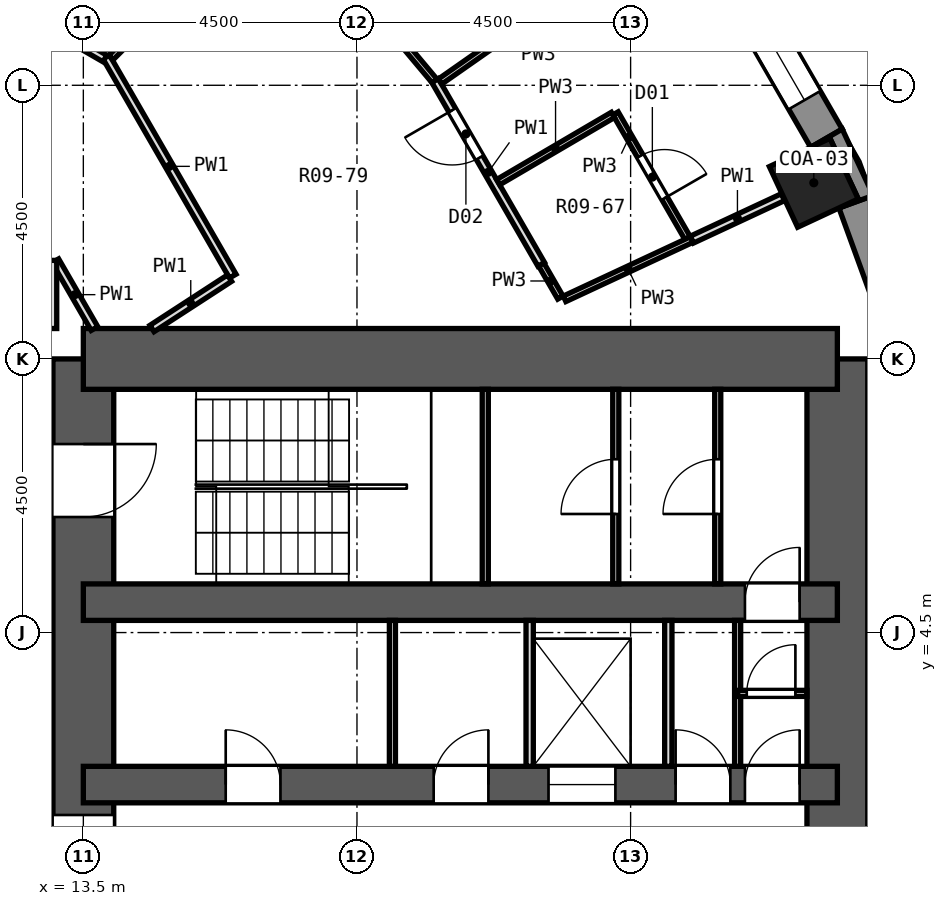
"""IFC4 building model, lengths in metres.
Left out: names, types, materials, properties, quantities, classifications, styles, units other than length and angle.
Written with IfcOpenShell. Run it as: python <this file> out.ifc"""

import sys

from ifc_helpers import new_model, si_unit, direction, frame, frame_2d, origin, origin_2d, place, context, subcontext, project, spatial, polyline, rectangle, outline, extrude, element, fill, save


model = new_model("IFC4")
c1 = context("Model", 3, precision=1e-05, world=origin(), true_north=direction((0.0, 1.0)))
c2 = subcontext(c1, "Body", "Model", "MODEL_VIEW")
j1 = project(units=[si_unit("LENGTHUNIT", "METRE"), si_unit("PLANEANGLEUNIT", "RADIAN")], contexts=[c1])
p1 = place(None, origin())
s1 = spatial("IfcSite", under=j1, at=p1, CompositionType="ELEMENT")
p2 = place(p1, origin())
s2 = spatial("IfcBuilding", under=s1, at=p2, CompositionType="ELEMENT")
p3 = place(p2, frame((0.0, 0.0, 26.3)))
s3 = spatial("IfcBuildingStorey", under=s2, at=p3, CompositionType="ELEMENT", Elevation=26.3)
p4 = place(p3, frame((25.512, 11.897, 0.0), z_axis=(0.0, 0.0, 1.0), x_axis=(0.906307787037, 0.422618261741, 0.0)))
e1 = element("IfcColumn", 1, at=p4, inside=s3, PredefinedType="COLUMN", context=c2, shape_type="SweptSolid", body=[
    extrude(rectangle(XDim=1.1, YDim=1.1, at=origin_2d()), origin(), (0.0, 0.0, 1.0), 3.3),
])
p5 = place(p3, frame((13.5, -9.0, 0.0), z_axis=(0.0, 0.0, 1.0), x_axis=(0.0, 1.0, 0.0)))
e2 = element("IfcWall", 2, at=p5, inside=s3, PredefinedType="SHEAR", context=c2, shape_type="SweptSolid", body=[
    extrude(rectangle(XDim=18.0, YDim=1.0, at=frame_2d((9.0, 0.0))), origin(), (0.0, 0.0, 1.0), 3.3),
])
p6 = place(p5, frame((15.4, 0.0, 0.0)))
e3 = element("IfcOpeningElement", 3, at=p6, cuts=e2, PredefinedType="OPENING", context=c2, shape_type="SweptSolid", body=[
    extrude(rectangle(XDim=1.2, YDim=2.1, at=frame_2d((0.6, 1.05))), frame((0.0, 0.512, 0.0), z_axis=(0.0, -1.0, 0.0), x_axis=(1.0, 0.0, 0.0)), (0.0, 0.0, 1.0), 1.024),
])
p7 = place(p5, frame((1.4, 0.0, 0.0)))
e4 = element("IfcOpeningElement", 4, at=p7, cuts=e2, PredefinedType="OPENING", context=c2, shape_type="SweptSolid", body=[
    extrude(rectangle(XDim=1.2, YDim=2.1, at=frame_2d((0.6, 1.05))), frame((0.0, 0.512, 0.0), z_axis=(0.0, -1.0, 0.0), x_axis=(1.0, 0.0, 0.0)), (0.0, 0.0, 1.0), 1.024),
])
p8 = place(p5, frame((7.5, 0.0, 0.0)))
e5 = element("IfcOpeningElement", 5, at=p8, cuts=e2, PredefinedType="OPENING", context=c2, shape_type="SweptSolid", body=[
    extrude(rectangle(XDim=3.0, YDim=2.4, at=frame_2d((1.5, 1.2))), frame((0.0, 0.512, 0.0), z_axis=(0.0, -1.0, 0.0), x_axis=(1.0, 0.0, 0.0)), (0.0, 0.0, 1.0), 1.024),
])
p9 = place(p3, frame((25.9, -9.0, 0.0), z_axis=(0.0, 0.0, 1.0), x_axis=(0.0, 1.0, 0.0)))
e6 = element("IfcWall", 6, at=p9, inside=s3, PredefinedType="SHEAR", context=c2, shape_type="SweptSolid", body=[
    extrude(rectangle(XDim=18.0, YDim=1.0, at=frame_2d((9.0, 0.0))), origin(), (0.0, 0.0, 1.0), 3.3),
])
p10 = place(p3, frame((13.5, 9.0, 0.0), z_axis=(0.0, 0.0, 1.0), x_axis=(1.0, 0.0, 0.0)))
e7 = element("IfcWall", 7, at=p10, inside=s3, PredefinedType="SHEAR", context=c2, shape_type="SweptSolid", body=[
    extrude(rectangle(XDim=12.4, YDim=1.0, at=frame_2d((6.2, 0.0))), origin(), (0.0, 0.0, 1.0), 3.3),
])
p11 = place(p3, frame((13.5, 5.0, 0.0), z_axis=(0.0, 0.0, 1.0), x_axis=(1.0, 0.0, 0.0)))
e8 = element("IfcWall", 8, at=p11, inside=s3, PredefinedType="SHEAR", context=c2, shape_type="SweptSolid", body=[
    extrude(rectangle(XDim=12.4, YDim=0.6, at=frame_2d((6.2, 0.0))), origin(), (0.0, 0.0, 1.0), 3.3),
])
p12 = place(p11, frame((10.88, 0.0, 0.0)))
e9 = element("IfcOpeningElement", 9, at=p12, cuts=e8, PredefinedType="OPENING", context=c2, shape_type="SweptSolid", body=[
    extrude(rectangle(XDim=0.9, YDim=2.1, at=frame_2d((0.45, 1.05))), frame((0.0, 0.312, 0.0), z_axis=(0.0, -1.0, 0.0), x_axis=(1.0, 0.0, 0.0)), (0.0, 0.0, 1.0), 0.624),
])
p13 = place(p3, frame((13.5, 2.0, 0.0), z_axis=(0.0, 0.0, 1.0), x_axis=(1.0, 0.0, 0.0)))
e10 = element("IfcWall", 10, at=p13, inside=s3, PredefinedType="SHEAR", context=c2, shape_type="SweptSolid", body=[
    extrude(rectangle(XDim=12.4, YDim=0.6, at=frame_2d((6.2, 0.0))), origin(), (0.0, 0.0, 1.0), 3.3),
])
p14 = place(p13, frame((7.65, 0.0, 0.0)))
e11 = element("IfcOpeningElement", 11, at=p14, cuts=e10, PredefinedType="OPENING", context=c2, shape_type="SweptSolid", body=[
    extrude(rectangle(XDim=1.1, YDim=2.1, at=frame_2d((0.55, 1.05))), frame((0.0, 0.312, 0.0), z_axis=(0.0, -1.0, 0.0), x_axis=(1.0, 0.0, 0.0)), (0.0, 0.0, 1.0), 0.624),
])
p15 = place(p13, frame((2.341, 0.0, 0.0)))
e12 = element("IfcOpeningElement", 12, at=p15, cuts=e10, PredefinedType="OPENING", context=c2, shape_type="SweptSolid", body=[
    extrude(rectangle(XDim=0.9, YDim=2.1, at=frame_2d((0.45, 1.05))), frame((0.0, 0.312, 0.0), z_axis=(0.0, -1.0, 0.0), x_axis=(1.0, 0.0, 0.0)), (0.0, 0.0, 1.0), 0.624),
])
p16 = place(p13, frame((5.761, 0.0, 0.0)))
e13 = element("IfcOpeningElement", 13, at=p16, cuts=e10, PredefinedType="OPENING", context=c2, shape_type="SweptSolid", body=[
    extrude(rectangle(XDim=0.9, YDim=2.1, at=frame_2d((0.45, 1.05))), frame((0.0, 0.312, 0.0), z_axis=(0.0, -1.0, 0.0), x_axis=(1.0, 0.0, 0.0)), (0.0, 0.0, 1.0), 0.624),
])
p17 = place(p13, frame((9.74, 0.0, 0.0)))
e14 = element("IfcOpeningElement", 14, at=p17, cuts=e10, PredefinedType="OPENING", context=c2, shape_type="SweptSolid", body=[
    extrude(rectangle(XDim=0.9, YDim=2.1, at=frame_2d((0.45, 1.05))), frame((0.0, 0.312, 0.0), z_axis=(0.0, -1.0, 0.0), x_axis=(1.0, 0.0, 0.0)), (0.0, 0.0, 1.0), 0.624),
])
p18 = place(p13, frame((10.88, 0.0, 0.0)))
e15 = element("IfcOpeningElement", 15, at=p18, cuts=e10, PredefinedType="OPENING", context=c2, shape_type="SweptSolid", body=[
    extrude(rectangle(XDim=0.9, YDim=2.1, at=frame_2d((0.45, 1.05))), frame((0.0, 0.312, 0.0), z_axis=(0.0, -1.0, 0.0), x_axis=(1.0, 0.0, 0.0)), (0.0, 0.0, 1.0), 0.624),
])
p19 = place(p3, frame((27.523, 7.971, 0.0), z_axis=(0.0, 0.0, 1.0), x_axis=(-0.342028474173, 0.939689588564, 0.0)))
e16 = element("IfcWall", 16, at=p19, inside=s3, PredefinedType="SOLIDWALL", context=c2, shape_type="SweptSolid", body=[
    extrude(rectangle(XDim=3.846, YDim=0.6, at=frame_2d((1.923, 0.0))), origin(), (0.0, 0.0, 1.0), 2.75),
])
p20 = place(p3, frame((25.721, 12.63, 0.0), z_axis=(0.0, 0.0, 1.0), x_axis=(-0.499989888488, 0.86603124159, 0.0)))
e17 = element("IfcWall", 17, at=p20, inside=s3, PredefinedType="SOLIDWALL", context=c2, shape_type="SweptSolid", body=[
    extrude(rectangle(XDim=3.846, YDim=0.6, at=frame_2d((1.923, 0.0))), origin(), (0.0, 0.0, 1.0), 2.75),
])
p21 = place(p20, frame((0.723, 0.0, 0.9)))
e18 = element("IfcOpeningElement", 18, at=p21, cuts=e17, PredefinedType="OPENING", context=c2, shape_type="SweptSolid", body=[
    extrude(rectangle(XDim=2.4, YDim=1.8, at=frame_2d((1.2, 0.9))), frame((0.0, 0.312, 0.0), z_axis=(0.0, -1.0, 0.0), x_axis=(1.0, 0.0, 0.0)), (0.0, 0.0, 1.0), 0.624),
])
p22 = place(p3, origin())
e19 = element("IfcWall", 19, at=p22, inside=s3, PredefinedType="SOLIDWALL", context=c2, shape_type="SweptSolid", body=[
    extrude(outline(polyline([(25.981, 12.78), (25.461, 12.479), (25.779, 12.628), (26.243, 11.631), (25.926, 11.483), (26.49, 11.688), (25.981, 12.78)])), origin(), (0.0, 0.0, 1.0), 2.75),
])
p23 = place(p3, frame((13.04, 10.614, 0.0), z_axis=(0.0, 0.0, 1.0), x_axis=(0.500018234033, -0.866014876105, 0.0)))
e20 = element("IfcWall", 20, at=p23, inside=s3, PredefinedType="PARTITIONING", context=c2, shape_type="SweptSolid", body=[
    extrude(rectangle(XDim=1.286, YDim=0.125, at=frame_2d((0.643, 0.0))), origin(), (0.0, 0.0, 1.0), 2.75),
])
p24 = place(p3, frame((13.873, 13.971, 0.0), z_axis=(0.0, 0.0, 1.0), x_axis=(0.500063859158, -0.865988531543, 0.0)))
e21 = element("IfcWall", 21, at=p24, inside=s3, PredefinedType="PARTITIONING", context=c2, shape_type="SweptSolid", body=[
    extrude(rectangle(XDim=4.168, YDim=0.125, at=frame_2d((2.084, 0.0))), origin(), (0.0, 0.0, 1.0), 2.75),
])
p25 = place(p3, frame((21.029, 10.555, 0.0), z_axis=(0.0, 0.0, 1.0), x_axis=(0.49975591337, -0.86616628141, 0.0)))
e22 = element("IfcWall", 22, at=p25, inside=s3, PredefinedType="PARTITIONING", context=c2, shape_type="SweptSolid", body=[
    extrude(rectangle(XDim=0.632, YDim=0.1, at=frame_2d((0.316, 0.0))), origin(), (0.0, 0.0, 1.0), 2.75),
])
p26 = place(p3, frame((19.283, 13.58, 0.0), z_axis=(0.0, 0.0, 1.0), x_axis=(0.500206547268, -0.865906120818, 0.0)))
e23 = element("IfcWall", 23, at=p26, inside=s3, PredefinedType="PARTITIONING", context=c2, shape_type="SweptSolid", body=[
    extrude(rectangle(XDim=3.492, YDim=0.125, at=frame_2d((1.746, 0.0))), origin(), (0.0, 0.0, 1.0), 2.75),
])
p27 = place(p26, frame((0.566, 0.0, 0.0)))
e24 = element("IfcOpeningElement", 24, at=p27, cuts=e23, PredefinedType="OPENING", context=c2, shape_type="SweptSolid", body=[
    extrude(rectangle(XDim=0.9, YDim=2.1, at=frame_2d((0.45, 1.05))), frame((0.0, 0.074, 0.0), z_axis=(0.0, -1.0, 0.0), x_axis=(1.0, 0.0, 0.0)), (0.0, 0.0, 1.0), 0.149),
])
p28 = place(p3, frame((22.252, 13.038, 0.0), z_axis=(0.0, 0.0, 1.0), x_axis=(0.500073288705, -0.865983086396, 0.0)))
e25 = element("IfcWall", 25, at=p28, inside=s3, PredefinedType="PARTITIONING", context=c2, shape_type="SweptSolid", body=[
    extrude(rectangle(XDim=2.369, YDim=0.1, at=frame_2d((1.185, 0.0))), origin(), (0.0, 0.0, 1.0), 2.75),
])
p29 = place(p28, frame((0.811, 0.0, 0.0)))
e26 = element("IfcOpeningElement", 26, at=p29, cuts=e25, PredefinedType="OPENING", context=c2, shape_type="SweptSolid", body=[
    extrude(rectangle(XDim=0.8, YDim=2.1, at=frame_2d((0.4, 1.05))), frame((0.0, 0.062, 0.0), z_axis=(0.0, -1.0, 0.0), x_axis=(1.0, 0.0, 0.0)), (0.0, 0.0, 1.0), 0.124),
])
p30 = place(p3, frame((17.865, 15.252, 0.0), z_axis=(0.0, 0.0, 1.0), x_axis=(0.642711379907, -0.766108401036, 0.0)))
e27 = element("IfcWall", 27, at=p30, inside=s3, PredefinedType="PARTITIONING", context=c2, shape_type="SweptSolid", body=[
    extrude(rectangle(XDim=2.192, YDim=0.1, at=frame_2d((1.096, 0.0))), origin(), (0.0, 0.0, 1.0), 2.75),
])
p31 = place(p3, frame((5.029, 19.036, 0.0), z_axis=(0.0, 0.0, 1.0), x_axis=(0.866024825845, -0.50000100102, 0.0)))
e28 = element("IfcWall", 28, at=p31, inside=s3, PredefinedType="PARTITIONING", context=c2, shape_type="SweptSolid", body=[
    extrude(rectangle(XDim=10.192, YDim=0.125, at=frame_2d((5.096, 0.0))), origin(), (0.0, 0.0, 1.0), 2.75),
])
p32 = place(p31, frame((3.116, 0.0, 0.0)))
e29 = element("IfcOpeningElement", 29, at=p32, cuts=e28, PredefinedType="OPENING", context=c2, shape_type="SweptSolid", body=[
    extrude(rectangle(XDim=1.0, YDim=2.1, at=frame_2d((0.5, 1.05))), frame((0.0, 0.074, 0.0), z_axis=(0.0, -1.0, 0.0), x_axis=(1.0, 0.0, 0.0)), (0.0, 0.0, 1.0), 0.149),
])
p33 = place(p3, frame((21.414, 9.988, 0.0), z_axis=(0.0, 0.0, 1.0), x_axis=(0.906293839501, 0.42264817104, 0.0)))
e30 = element("IfcWall", 30, at=p33, inside=s3, PredefinedType="PARTITIONING", context=c2, shape_type="SweptSolid", body=[
    extrude(rectangle(XDim=2.309, YDim=0.1, at=frame_2d((1.155, 0.0))), origin(), (0.0, 0.0, 1.0), 2.75),
])
p34 = place(p3, frame((23.508, 10.962, 0.0), z_axis=(0.0, 0.0, 1.0), x_axis=(0.906360566975, 0.422505056339, 0.0)))
e31 = element("IfcWall", 31, at=p34, inside=s3, PredefinedType="PARTITIONING", context=c2, shape_type="SweptSolid", body=[
    extrude(rectangle(XDim=1.651, YDim=0.125, at=frame_2d((0.826, 0.0))), origin(), (0.0, 0.0, 1.0), 2.75),
])
p35 = place(p3, frame((20.322, 11.906, 0.0), z_axis=(0.0, 0.0, 1.0), x_axis=(0.862687894762, 0.505736686657, 0.0)))
e32 = element("IfcWall", 32, at=p35, inside=s3, PredefinedType="PARTITIONING", context=c2, shape_type="SweptSolid", body=[
    extrude(rectangle(XDim=2.187, YDim=0.1, at=frame_2d((1.094, 0.0))), origin(), (0.0, 0.0, 1.0), 2.75),
])
p36 = place(p3, frame((14.629, 9.5, 0.0), z_axis=(0.0, 0.0, 1.0), x_axis=(0.83882853689, 0.544395706908, 0.0)))
e33 = element("IfcWall", 33, at=p36, inside=s3, PredefinedType="PARTITIONING", context=c2, shape_type="SweptSolid", body=[
    extrude(rectangle(XDim=1.521, YDim=0.125, at=frame_2d((0.76, 0.0))), origin(), (0.0, 0.0, 1.0), 2.75),
])
p37 = place(p3, frame((19.366, 13.561, 0.0), z_axis=(0.0, 0.0, 1.0), x_axis=(0.819199961449, 0.57350799747, 0.0)))
e34 = element("IfcWall", 34, at=p37, inside=s3, PredefinedType="PARTITIONING", context=c2, shape_type="SweptSolid", body=[
    extrude(rectangle(XDim=3.948, YDim=0.1, at=frame_2d((1.974, 0.0))), origin(), (0.0, 0.0, 1.0), 2.75),
])
p38 = place(p3, frame((13.953, 13.953, 0.0), z_axis=(0.0, 0.0, 1.0), x_axis=(0.707106781187, 0.707106781187, 0.0)))
e35 = element("IfcWall", 35, at=p38, inside=s3, PredefinedType="PARTITIONING", context=c2, shape_type="SweptSolid", body=[
    extrude(rectangle(XDim=2.061, YDim=0.1, at=frame_2d((1.031, 0.0))), origin(), (0.0, 0.0, 1.0), 2.75),
])
p39 = place(p3, frame((13.0, 9.5, 0.0), z_axis=(0.0, 0.0, 1.0), x_axis=(0.0, 1.0, 0.0)))
e36 = element("IfcWall", 36, at=p39, inside=s3, PredefinedType="PARTITIONING", context=c2, shape_type="SweptSolid", body=[
    extrude(rectangle(XDim=1.121, YDim=0.125, at=frame_2d((0.56, 0.0))), origin(), (0.0, 0.0, 1.0), 2.75),
])
p40 = place(p3, frame((18.583, 2.3, 0.0), z_axis=(0.0, 0.0, 1.0), x_axis=(0.0, 1.0, 0.0)))
e37 = element("IfcWall", 37, at=p40, inside=s3, PredefinedType="PARTITIONING", context=c2, shape_type="SweptSolid", body=[
    extrude(rectangle(XDim=2.4, YDim=0.1, at=frame_2d((1.2, 0.0))), origin(), (0.0, 0.0, 1.0), 2.75),
])
for number, where, z_axis, x_axis in (
    (38, (20.84, 2.3, 0.0), (0.0, 0.0, 1.0), (0.0, 1.0, 0.0)),
    (39, (23.12, 2.3, 0.0), (0.0, 0.0, 1.0), (0.0, 1.0, 0.0)),
):
    element("IfcWall", number, at=place(p3, frame(where, z_axis=z_axis, x_axis=x_axis)), inside=s3, PredefinedType="PARTITIONING", context=c2, shape_type="SweptSolid", body=[
        extrude(rectangle(XDim=2.4, YDim=0.12, at=frame_2d((1.2, 0.0))), origin(), (0.0, 0.0, 1.0), 2.75),
    ])
p41 = place(p3, frame((24.26, 2.3, 0.0), z_axis=(0.0, 0.0, 1.0), x_axis=(0.0, 1.0, 0.0)))
e40 = element("IfcWall", 40, at=p41, inside=s3, PredefinedType="PARTITIONING", context=c2, shape_type="SweptSolid", body=[
    extrude(rectangle(XDim=2.4, YDim=0.1, at=frame_2d((1.2, 0.0))), origin(), (0.0, 0.0, 1.0), 2.75),
])
p42 = place(p3, frame((24.26, 3.5, 0.0), z_axis=(0.0, 0.0, 1.0), x_axis=(1.0, 0.0, 0.0)))
e41 = element("IfcWall", 41, at=p42, inside=s3, PredefinedType="PARTITIONING", context=c2, shape_type="SweptSolid", body=[
    extrude(rectangle(XDim=1.14, YDim=0.1, at=frame_2d((0.57, 0.0))), origin(), (0.0, 0.0, 1.0), 2.75),
])
p43 = place(p42, frame((0.15, 0.0, 0.0)))
e42 = element("IfcOpeningElement", 42, at=p43, cuts=e41, PredefinedType="OPENING", context=c2, shape_type="SweptSolid", body=[
    extrude(rectangle(XDim=0.8, YDim=2.1, at=frame_2d((0.4, 1.05))), frame((0.0, 0.062, 0.0), z_axis=(0.0, -1.0, 0.0), x_axis=(1.0, 0.0, 0.0)), (0.0, 0.0, 1.0), 0.124),
])
p44 = place(p3, frame((20.11, 5.3, 0.0), z_axis=(0.0, 0.0, 1.0), x_axis=(0.0, 1.0, 0.0)))
e43 = element("IfcWall", 43, at=p44, inside=s3, PredefinedType="PARTITIONING", context=c2, shape_type="SweptSolid", body=[
    extrude(rectangle(XDim=3.2, YDim=0.1, at=frame_2d((1.6, 0.0))), origin(), (0.0, 0.0, 1.0), 2.75),
])
p45 = place(p3, frame((22.256, 5.3, 0.0), z_axis=(0.0, 0.0, 1.0), x_axis=(0.0, 1.0, 0.0)))
e44 = element("IfcWall", 44, at=p45, inside=s3, PredefinedType="PARTITIONING", context=c2, shape_type="SweptSolid", body=[
    extrude(rectangle(XDim=3.2, YDim=0.1, at=frame_2d((1.6, 0.0))), origin(), (0.0, 0.0, 1.0), 2.75),
])
p46 = place(p45, frame((1.15, 0.0, 0.0)))
e45 = element("IfcOpeningElement", 45, at=p46, cuts=e44, PredefinedType="OPENING", context=c2, shape_type="SweptSolid", body=[
    extrude(rectangle(XDim=0.9, YDim=2.1, at=frame_2d((0.45, 1.05))), frame((0.0, 0.062, 0.0), z_axis=(0.0, -1.0, 0.0), x_axis=(1.0, 0.0, 0.0)), (0.0, 0.0, 1.0), 0.124),
])
p47 = place(p3, frame((23.933, 5.3, 0.0), z_axis=(0.0, 0.0, 1.0), x_axis=(0.0, 1.0, 0.0)))
e46 = element("IfcWall", 46, at=p47, inside=s3, PredefinedType="PARTITIONING", context=c2, shape_type="SweptSolid", body=[
    extrude(rectangle(XDim=3.2, YDim=0.1, at=frame_2d((1.6, 0.0))), origin(), (0.0, 0.0, 1.0), 2.75),
])
p48 = place(p47, frame((1.15, 0.0, 0.0)))
e47 = element("IfcOpeningElement", 47, at=p48, cuts=e46, PredefinedType="OPENING", context=c2, shape_type="SweptSolid", body=[
    extrude(rectangle(XDim=0.9, YDim=2.1, at=frame_2d((0.45, 1.05))), frame((0.0, 0.062, 0.0), z_axis=(0.0, -1.0, 0.0), x_axis=(1.0, 0.0, 0.0)), (0.0, 0.0, 1.0), 0.124),
])
p49 = place(p21, origin())
e48 = element("IfcWindow", 48, at=p49, inside=s3, PartitioningType="SINGLE_PANEL", PredefinedType="WINDOW", context=c2, shape_type="SweptSolid", body=[
    extrude(rectangle(XDim=2.4, YDim=1.8, at=frame_2d((1.2, 0.9))), frame((0.0, 0.18, 0.0), z_axis=(0.0, -1.0, 0.0), x_axis=(1.0, 0.0, 0.0)), (0.0, 0.0, 1.0), 0.06),
])
fill(e18, e48)
p50 = place(p29, origin())
e49 = element("IfcDoor", 49, at=p50, inside=s3, OperationType="SINGLE_SWING_RIGHT", PredefinedType="DOOR", context=c2, shape_type="SweptSolid", body=[
    extrude(rectangle(XDim=0.8, YDim=2.1, at=frame_2d((0.4, 1.05))), frame((0.0, 0.025, 0.0), z_axis=(0.0, -1.0, 0.0), x_axis=(1.0, 0.0, 0.0)), (0.0, 0.0, 1.0), 0.05),
])
fill(e26, e49)
p51 = place(p27, frame((0.9, 0.0, 0.0), z_axis=(0.0, 0.0, 1.0), x_axis=(-1.0, 0.0, 0.0)))
e50 = element("IfcDoor", 50, at=p51, inside=s3, OperationType="SINGLE_SWING_RIGHT", PredefinedType="DOOR", context=c2, shape_type="SweptSolid", body=[
    extrude(rectangle(XDim=0.9, YDim=2.1, at=frame_2d((0.45, 1.05))), frame((0.0, 0.025, 0.0), z_axis=(0.0, -1.0, 0.0), x_axis=(1.0, 0.0, 0.0)), (0.0, 0.0, 1.0), 0.05),
])
fill(e24, e50)
p52 = place(p14, origin())
e51 = element("IfcDoor", 51, at=p52, inside=s3, OperationType="DOUBLE_DOOR_SLIDING", PredefinedType="DOOR", context=c2, shape_type="SweptSolid", body=[
    extrude(rectangle(XDim=1.1, YDim=2.1, at=frame_2d((0.55, 1.05))), frame((0.0, 0.025, 0.0), z_axis=(0.0, -1.0, 0.0), x_axis=(1.0, 0.0, 0.0)), (0.0, 0.0, 1.0), 0.05),
])
fill(e11, e51)
p53 = place(p15, origin())
e52 = element("IfcDoor", 52, at=p53, inside=s3, OperationType="SINGLE_SWING_LEFT", PredefinedType="DOOR", context=c2, shape_type="SweptSolid", body=[
    extrude(rectangle(XDim=0.9, YDim=2.1, at=frame_2d((0.45, 1.05))), frame((0.0, 0.025, 0.0), z_axis=(0.0, -1.0, 0.0), x_axis=(1.0, 0.0, 0.0)), (0.0, 0.0, 1.0), 0.05),
])
fill(e12, e52)
p54 = place(p16, origin())
e53 = element("IfcDoor", 53, at=p54, inside=s3, OperationType="SINGLE_SWING_RIGHT", PredefinedType="DOOR", context=c2, shape_type="SweptSolid", body=[
    extrude(rectangle(XDim=0.9, YDim=2.1, at=frame_2d((0.45, 1.05))), frame((0.0, 0.025, 0.0), z_axis=(0.0, -1.0, 0.0), x_axis=(1.0, 0.0, 0.0)), (0.0, 0.0, 1.0), 0.05),
])
fill(e13, e53)
p55 = place(p17, origin())
e54 = element("IfcDoor", 54, at=p55, inside=s3, OperationType="SINGLE_SWING_LEFT", PredefinedType="DOOR", context=c2, shape_type="SweptSolid", body=[
    extrude(rectangle(XDim=0.9, YDim=2.1, at=frame_2d((0.45, 1.05))), frame((0.0, 0.025, 0.0), z_axis=(0.0, -1.0, 0.0), x_axis=(1.0, 0.0, 0.0)), (0.0, 0.0, 1.0), 0.05),
])
fill(e14, e54)
p56 = place(p18, origin())
e55 = element("IfcDoor", 55, at=p56, inside=s3, OperationType="SINGLE_SWING_RIGHT", PredefinedType="DOOR", context=c2, shape_type="SweptSolid", body=[
    extrude(rectangle(XDim=0.9, YDim=2.1, at=frame_2d((0.45, 1.05))), frame((0.0, 0.025, 0.0), z_axis=(0.0, -1.0, 0.0), x_axis=(1.0, 0.0, 0.0)), (0.0, 0.0, 1.0), 0.05),
])
fill(e15, e55)
p57 = place(p43, origin())
e56 = element("IfcDoor", 56, at=p57, inside=s3, OperationType="SINGLE_SWING_RIGHT", PredefinedType="DOOR", context=c2, shape_type="SweptSolid", body=[
    extrude(rectangle(XDim=0.8, YDim=2.1, at=frame_2d((0.4, 1.05))), frame((0.0, 0.025, 0.0), z_axis=(0.0, -1.0, 0.0), x_axis=(1.0, 0.0, 0.0)), (0.0, 0.0, 1.0), 0.05),
])
fill(e42, e56)
p58 = place(p48, origin())
e57 = element("IfcDoor", 57, at=p58, inside=s3, OperationType="SINGLE_SWING_LEFT", PredefinedType="DOOR", context=c2, shape_type="SweptSolid", body=[
    extrude(rectangle(XDim=0.9, YDim=2.1, at=frame_2d((0.45, 1.05))), frame((0.0, 0.025, 0.0), z_axis=(0.0, -1.0, 0.0), x_axis=(1.0, 0.0, 0.0)), (0.0, 0.0, 1.0), 0.05),
])
fill(e47, e57)
p59 = place(p46, origin())
e58 = element("IfcDoor", 58, at=p59, inside=s3, OperationType="SINGLE_SWING_LEFT", PredefinedType="DOOR", context=c2, shape_type="SweptSolid", body=[
    extrude(rectangle(XDim=0.9, YDim=2.1, at=frame_2d((0.45, 1.05))), frame((0.0, 0.025, 0.0), z_axis=(0.0, -1.0, 0.0), x_axis=(1.0, 0.0, 0.0)), (0.0, 0.0, 1.0), 0.05),
])
fill(e45, e58)
p60 = place(p12, origin())
e59 = element("IfcDoor", 59, at=p60, inside=s3, OperationType="SINGLE_SWING_RIGHT", PredefinedType="DOOR", context=c2, shape_type="SweptSolid", body=[
    extrude(rectangle(XDim=0.9, YDim=2.1, at=frame_2d((0.45, 1.05))), frame((0.0, 0.025, 0.0), z_axis=(0.0, -1.0, 0.0), x_axis=(1.0, 0.0, 0.0)), (0.0, 0.0, 1.0), 0.05),
])
fill(e9, e59)
p61 = place(p6, frame((1.2, 0.0, 0.0), z_axis=(0.0, 0.0, 1.0), x_axis=(-1.0, 0.0, 0.0)))
e60 = element("IfcDoor", 60, at=p61, inside=s3, OperationType="SINGLE_SWING_LEFT", PredefinedType="DOOR", context=c2, shape_type="SweptSolid", body=[
    extrude(rectangle(XDim=1.2, YDim=2.1, at=frame_2d((0.6, 1.05))), frame((0.0, 0.025, 0.0), z_axis=(0.0, -1.0, 0.0), x_axis=(1.0, 0.0, 0.0)), (0.0, 0.0, 1.0), 0.05),
])
fill(e3, e60)
p62 = place(p8, origin())
e61 = element("IfcDoor", 61, at=p62, inside=s3, OperationType="DOUBLE_DOOR_SLIDING", PredefinedType="DOOR", context=c2, shape_type="SweptSolid", body=[
    extrude(rectangle(XDim=3.0, YDim=2.4, at=frame_2d((1.5, 1.2))), frame((0.0, 0.025, 0.0), z_axis=(0.0, -1.0, 0.0), x_axis=(1.0, 0.0, 0.0)), (0.0, 0.0, 1.0), 0.05),
])
fill(e5, e61)
save(model, sys.argv[1])
